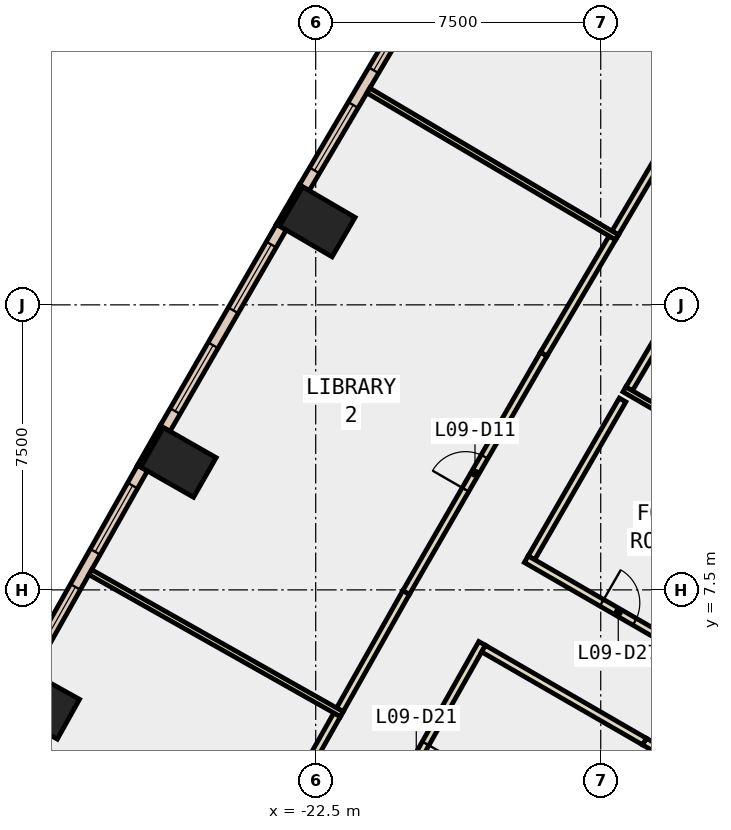
"""IFC4 building model, lengths in metres.
Left out: names, types, materials, properties, quantities, classifications, styles, units other than length and angle.
Written with IfcOpenShell. Run it as: python <this file> out.ifc"""

import sys

from ifc_helpers import new_model, si_unit, direction, frame, frame_2d, origin, origin_2d, place, context, subcontext, project, spatial, polyline, rectangle, outline, extrude, element, fill, save


model = new_model("IFC4")
c1 = context("Model", 3, precision=1e-05, world=origin(), true_north=direction((0.0, 1.0)))
c2 = subcontext(c1, "Body", "Model", "MODEL_VIEW")
j1 = project(units=[si_unit("LENGTHUNIT", "METRE"), si_unit("PLANEANGLEUNIT", "RADIAN")], contexts=[c1])
p1 = place(None, origin())
s1 = spatial("IfcSite", under=j1, at=p1, CompositionType="ELEMENT")
p2 = place(p1, origin())
s2 = spatial("IfcBuilding", under=s1, at=p2, CompositionType="ELEMENT")
p3 = place(p2, frame((0.0, 0.0, 47.6)))
s3 = spatial("IfcBuildingStorey", under=s2, at=p3, CompositionType="ELEMENT", Elevation=47.6)
for number, where, z_axis, x_axis in (
    (1, (-22.457, 17.186, -0.4), (0.0, 0.0, 1.0), (0.504, 0.864, 0.0)),
    (2, (-26.112, 10.855, -0.4), (0.0, 0.0, 1.0), (0.496, 0.869, 0.0)),
    (3, (-29.706, 4.487, -0.4), (0.0, 0.0, 1.0), (0.487, 0.873, 0.0)),
):
    element("IfcColumn", number, at=place(p3, frame(where, z_axis=z_axis, x_axis=x_axis)), inside=s3, PredefinedType="COLUMN", context=c2, shape_type="SweptSolid", body=[
        extrude(rectangle(XDim=1.2, YDim=1.6, at=origin_2d()), origin(), (0.0, 0.0, 1.0), 4.2),
    ])
p4 = place(p3, frame((0.0, 0.0, -0.4)))
e4 = element("IfcWall", 4, at=p4, inside=s3, PredefinedType="SHEAR", context=c2, shape_type="SweptSolid", body=[
    extrude(outline(polyline([(-12.402, 3.02), (-13.267, 3.52), (-13.856, 2.5), (-12.702, 2.5), (-12.402, 3.02)])), origin(), (0.0, 0.0, 1.0), 4.2),
])
p5 = place(p3, frame((-22.888, 18.133, 0.0), z_axis=(0.0, 0.0, 1.0), x_axis=(-0.504225229382, -0.863572184623, 0.0)))
e5 = element("IfcWall", 5, at=p5, inside=s3, PredefinedType="STANDARD", context=c2, shape_type="SweptSolid", body=[
    extrude(rectangle(XDim=1.2, YDim=0.1, at=frame_2d((0.6, 0.0))), origin(), (0.0, 0.0, 1.0), 3.8),
])
p6 = place(p3, frame((-26.553, 11.797, 0.0), z_axis=(0.0, 0.0, 1.0), x_axis=(-0.495766453659, -0.86845588456, 0.0)))
e6 = element("IfcWall", 6, at=p6, inside=s3, PredefinedType="STANDARD", context=c2, shape_type="SweptSolid", body=[
    extrude(rectangle(XDim=1.2, YDim=0.1, at=frame_2d((0.6, 0.0))), origin(), (0.0, 0.0, 1.0), 3.8),
])
p7 = place(p3, frame((-19.688, 23.351, 0.0), z_axis=(0.0, 0.0, 1.0), x_axis=(-0.508412153373, -0.861113861404, 0.0)))
e7 = element("IfcWall", 7, at=p7, inside=s3, PredefinedType="STANDARD", context=c2, shape_type="SweptSolid", body=[
    extrude(rectangle(XDim=6.121, YDim=0.3, at=frame_2d((3.061, 0.0))), origin(), (0.0, 0.0, 1.0), 3.8),
])
p8 = place(p7, frame((0.53, 0.0, 0.9)))
e8 = element("IfcOpeningElement", 8, at=p8, cuts=e7, PredefinedType="OPENING", context=c2, shape_type="SweptSolid", body=[
    extrude(rectangle(XDim=2.0, YDim=2.6, at=frame_2d((1.0, 1.3))), frame((0.0, 0.16, 0.0), z_axis=(0.0, -1.0, 0.0), x_axis=(1.0, 0.0, 0.0)), (0.0, 0.0, 1.0), 0.32),
])
p9 = place(p7, frame((3.591, 0.0, 0.9)))
e9 = element("IfcOpeningElement", 9, at=p9, cuts=e7, PredefinedType="OPENING", context=c2, shape_type="SweptSolid", body=[
    extrude(rectangle(XDim=2.0, YDim=2.6, at=frame_2d((1.0, 1.3))), frame((0.0, 0.16, 0.0), z_axis=(0.0, -1.0, 0.0), x_axis=(1.0, 0.0, 0.0)), (0.0, 0.0, 1.0), 0.32),
])
p10 = place(p3, frame((-23.404, 17.046, 0.0), z_axis=(0.0, 0.0, 1.0), x_axis=(-0.499957248001, -0.866050085256, 0.0)))
e10 = element("IfcWall", 10, at=p10, inside=s3, PredefinedType="STANDARD", context=c2, shape_type="SweptSolid", body=[
    extrude(rectangle(XDim=6.121, YDim=0.3, at=frame_2d((3.06, 0.0))), origin(), (0.0, 0.0, 1.0), 3.8),
])
p11 = place(p10, frame((0.53, 0.0, 0.9)))
e11 = element("IfcOpeningElement", 11, at=p11, cuts=e10, PredefinedType="OPENING", context=c2, shape_type="SweptSolid", body=[
    extrude(rectangle(XDim=2.0, YDim=2.6, at=frame_2d((1.0, 1.3))), frame((0.0, 0.16, 0.0), z_axis=(0.0, -1.0, 0.0), x_axis=(1.0, 0.0, 0.0)), (0.0, 0.0, 1.0), 0.32),
])
p12 = place(p10, frame((3.591, 0.0, 0.9)))
e12 = element("IfcOpeningElement", 12, at=p12, cuts=e10, PredefinedType="OPENING", context=c2, shape_type="SweptSolid", body=[
    extrude(rectangle(XDim=2.0, YDim=2.6, at=frame_2d((1.0, 1.3))), frame((0.0, 0.16, 0.0), z_axis=(0.0, -1.0, 0.0), x_axis=(1.0, 0.0, 0.0)), (0.0, 0.0, 1.0), 0.32),
])
p13 = place(p3, frame((-27.058, 10.705, 0.0), z_axis=(0.0, 0.0, 1.0), x_axis=(-0.49151046248, -0.870871669807, 0.0)))
e13 = element("IfcWall", 13, at=p13, inside=s3, PredefinedType="STANDARD", context=c2, shape_type="SweptSolid", body=[
    extrude(rectangle(XDim=6.122, YDim=0.3, at=frame_2d((3.061, 0.0))), origin(), (0.0, 0.0, 1.0), 3.8),
])
p14 = place(p13, frame((0.53, 0.0, 0.9)))
e14 = element("IfcOpeningElement", 14, at=p14, cuts=e13, PredefinedType="OPENING", context=c2, shape_type="SweptSolid", body=[
    extrude(rectangle(XDim=2.0, YDim=2.6, at=frame_2d((1.0, 1.3))), frame((0.0, 0.16, 0.0), z_axis=(0.0, -1.0, 0.0), x_axis=(1.0, 0.0, 0.0)), (0.0, 0.0, 1.0), 0.32),
])
p15 = place(p13, frame((3.591, 0.0, 0.9)))
e15 = element("IfcOpeningElement", 15, at=p15, cuts=e13, PredefinedType="OPENING", context=c2, shape_type="SweptSolid", body=[
    extrude(rectangle(XDim=2.0, YDim=2.6, at=frame_2d((1.0, 1.3))), frame((0.0, 0.16, 0.0), z_axis=(0.0, -1.0, 0.0), x_axis=(1.0, 0.0, 0.0)), (0.0, 0.0, 1.0), 0.32),
])
p16 = place(p3, frame((-14.425, 12.497, 0.0), z_axis=(0.0, 0.0, 1.0), x_axis=(-0.500026519606, -0.866010092142, 0.0)))
e16 = element("IfcWall", 16, at=p16, inside=s3, PredefinedType="PARTITIONING", context=c2, shape_type="SweptSolid", body=[
    extrude(rectangle(XDim=4.796, YDim=0.2, at=frame_2d((2.398, 0.0))), origin(), (0.0, 0.0, 1.0), 3.8),
])
p17 = place(p3, frame((-16.96, 8.308, 0.0), z_axis=(0.0, 0.0, 1.0), x_axis=(0.866018717003, -0.500011581666, 0.0)))
e17 = element("IfcWall", 17, at=p17, inside=s3, PredefinedType="PARTITIONING", context=c2, shape_type="SweptSolid", body=[
    extrude(rectangle(XDim=5.092, YDim=0.2, at=frame_2d((2.546, 0.0))), origin(), (0.0, 0.0, 1.0), 3.8),
])
p18 = place(p17, frame((2.296, 0.0, 0.0)))
e18 = element("IfcOpeningElement", 18, at=p18, cuts=e17, PredefinedType="OPENING", context=c2, shape_type="SweptSolid", body=[
    extrude(rectangle(XDim=1.0, YDim=2.1, at=frame_2d((0.5, 1.05))), frame((0.0, 0.11, 0.0), z_axis=(0.0, -1.0, 0.0), x_axis=(1.0, 0.0, 0.0)), (0.0, 0.0, 1.0), 0.22),
])
p19 = place(p3, frame((-13.323, 14.364, 0.0), z_axis=(0.0, 0.0, 1.0), x_axis=(-0.508274698505, -0.861195001646, 0.0)))
e19 = element("IfcWall", 19, at=p19, inside=s3, PredefinedType="PARTITIONING", context=c2, shape_type="SweptSolid", body=[
    extrude(rectangle(XDim=1.828, YDim=0.2, at=frame_2d((0.914, 0.0))), origin(), (0.0, 0.0, 1.0), 3.8),
])
p20 = place(p3, frame((-13.417, 3.26, 0.0), z_axis=(0.0, 0.0, 1.0), x_axis=(-0.866071776036, 0.499919672301, 0.0)))
e20 = element("IfcWall", 20, at=p20, inside=s3, PredefinedType="PARTITIONING", context=c2, shape_type="SweptSolid", body=[
    extrude(rectangle(XDim=0.5, YDim=0.2, at=frame_2d((0.25, 0.0))), origin(), (0.0, 0.0, 1.0), 2.4),
])
p21 = place(p3, frame((-18.122, 6.092, 0.0), z_axis=(0.0, 0.0, 1.0), x_axis=(-0.491430359405, -0.870916874251, 0.0)))
e21 = element("IfcWall", 21, at=p21, inside=s3, PredefinedType="PARTITIONING", context=c2, shape_type="SweptSolid", body=[
    extrude(rectangle(XDim=7.047, YDim=0.2, at=frame_2d((3.523, 0.0))), origin(), (0.0, 0.0, 1.0), 3.8),
])
p22 = place(p21, frame((3.024, 0.0, 0.0)))
e22 = element("IfcOpeningElement", 22, at=p22, cuts=e21, PredefinedType="OPENING", context=c2, shape_type="SweptSolid", body=[
    extrude(rectangle(XDim=1.0, YDim=2.1, at=frame_2d((0.5, 1.05))), frame((0.0, 0.11, 0.0), z_axis=(0.0, -1.0, 0.0), x_axis=(1.0, 0.0, 0.0)), (0.0, 0.0, 1.0), 0.22),
])
p23 = place(p3, frame((-14.618, 16.891, 0.0), z_axis=(0.0, 0.0, 1.0), x_axis=(0.508267810274, 0.861199067022, 0.0)))
e23 = element("IfcWall", 23, at=p23, inside=s3, PredefinedType="PARTITIONING", context=c2, shape_type="SweptSolid", body=[
    extrude(rectangle(XDim=3.547, YDim=0.2, at=frame_2d((1.774, 0.0))), origin(), (0.0, 0.0, 1.0), 3.8),
])
p24 = place(p3, frame((-21.863, 4.345, 0.0), z_axis=(0.0, 0.0, 1.0), x_axis=(0.491394823876, 0.87093692485, 0.0)))
e24 = element("IfcWall", 24, at=p24, inside=s3, PredefinedType="PARTITIONING", context=c2, shape_type="SweptSolid", body=[
    extrude(rectangle(XDim=3.547, YDim=0.2, at=frame_2d((1.773, 0.0))), origin(), (0.0, 0.0, 1.0), 3.8),
])
p25 = place(p3, frame((-20.12, 7.434, 0.0), z_axis=(0.0, 0.0, 1.0), x_axis=(0.500039488902, 0.866002603656, 0.0)))
e25 = element("IfcWall", 25, at=p25, inside=s3, PredefinedType="PARTITIONING", context=c2, shape_type="SweptSolid", body=[
    extrude(rectangle(XDim=7.244, YDim=0.2, at=frame_2d((3.622, 0.0))), origin(), (0.0, 0.0, 1.0), 3.8),
])
p26 = place(p25, frame((3.122, 0.0, 0.0)))
e26 = element("IfcOpeningElement", 26, at=p26, cuts=e25, PredefinedType="OPENING", context=c2, shape_type="SweptSolid", body=[
    extrude(rectangle(XDim=1.0, YDim=2.1, at=frame_2d((0.5, 1.05))), frame((0.0, 0.11, 0.0), z_axis=(0.0, -1.0, 0.0), x_axis=(1.0, 0.0, 0.0)), (0.0, 0.0, 1.0), 0.22),
])
p27 = place(p3, frame((-16.498, 13.707, 0.0), z_axis=(0.0, 0.0, 1.0), x_axis=(0.508471945541, 0.861078556578, 0.0)))
e27 = element("IfcWall", 27, at=p27, inside=s3, PredefinedType="PARTITIONING", context=c2, shape_type="SweptSolid", body=[
    extrude(rectangle(XDim=3.548, YDim=0.2, at=frame_2d((1.774, 0.0))), origin(), (0.0, 0.0, 1.0), 3.8),
])
p28 = place(p3, frame((-23.681, 1.124, 0.0), z_axis=(0.0, 0.0, 1.0), x_axis=(0.491485799319, 0.870885588965, 0.0)))
e28 = element("IfcWall", 28, at=p28, inside=s3, PredefinedType="PARTITIONING", context=c2, shape_type="SweptSolid", body=[
    extrude(rectangle(XDim=3.548, YDim=0.2, at=frame_2d((1.774, 0.0))), origin(), (0.0, 0.0, 1.0), 3.8),
])
p29 = place(p3, frame((-14.377, 12.775, 0.0), z_axis=(0.0, 0.0, 1.0), x_axis=(0.866051730117, -0.499954398681, 0.0)))
e29 = element("IfcWall", 29, at=p29, inside=s3, PredefinedType="PARTITIONING", context=c2, shape_type="SweptSolid", body=[
    extrude(rectangle(XDim=5.588, YDim=0.15, at=frame_2d((2.794, 0.0))), origin(), (0.0, 0.0, 1.0), 3.8),
])
p30 = place(p3, frame((-14.57, 16.776, 0.0), z_axis=(0.0, 0.0, 1.0), x_axis=(-0.861124703857, 0.508393788718, 0.0)))
e30 = element("IfcWall", 30, at=p30, inside=s3, PredefinedType="PARTITIONING", context=c2, shape_type="SweptSolid", body=[
    extrude(rectangle(XDim=7.6, YDim=0.15, at=frame_2d((3.8, 0.0))), origin(), (0.0, 0.0, 1.0), 3.8),
])
p31 = place(p3, frame((-21.813, 4.231, 0.0), z_axis=(0.0, 0.0, 1.0), x_axis=(-0.870901264369, 0.491458022337, 0.0)))
e31 = element("IfcWall", 31, at=p31, inside=s3, PredefinedType="PARTITIONING", context=c2, shape_type="SweptSolid", body=[
    extrude(rectangle(XDim=7.6, YDim=0.15, at=frame_2d((3.8, 0.0))), origin(), (0.0, 0.0, 1.0), 3.8),
])
p32 = place(p3, frame((-13.85, 3.51, 0.0), z_axis=(0.0, 0.0, 1.0), x_axis=(-0.865969361037, 0.500097056325, 0.0)))
e32 = element("IfcWall", 32, at=p32, inside=s3, PredefinedType="PARTITIONING", context=c2, shape_type="SweptSolid", body=[
    extrude(rectangle(XDim=4.889, YDim=0.2, at=frame_2d((2.445, 0.0))), origin(), (0.0, 0.0, 1.0), 3.8),
])
p33 = place(p8, origin())
e33 = element("IfcWindow", 33, at=p33, inside=s3, PartitioningType="SINGLE_PANEL", PredefinedType="WINDOW", context=c2, shape_type="SweptSolid", body=[
    extrude(rectangle(XDim=2.0, YDim=2.6, at=frame_2d((1.0, 1.3))), frame((0.0, 0.03, 0.0), z_axis=(0.0, -1.0, 0.0), x_axis=(1.0, 0.0, 0.0)), (0.0, 0.0, 1.0), 0.06),
])
fill(e8, e33)
p34 = place(p9, origin())
e34 = element("IfcWindow", 34, at=p34, inside=s3, PartitioningType="SINGLE_PANEL", PredefinedType="WINDOW", context=c2, shape_type="SweptSolid", body=[
    extrude(rectangle(XDim=2.0, YDim=2.6, at=frame_2d((1.0, 1.3))), frame((0.0, 0.03, 0.0), z_axis=(0.0, -1.0, 0.0), x_axis=(1.0, 0.0, 0.0)), (0.0, 0.0, 1.0), 0.06),
])
fill(e9, e34)
p35 = place(p11, origin())
e35 = element("IfcWindow", 35, at=p35, inside=s3, PartitioningType="SINGLE_PANEL", PredefinedType="WINDOW", context=c2, shape_type="SweptSolid", body=[
    extrude(rectangle(XDim=2.0, YDim=2.6, at=frame_2d((1.0, 1.3))), frame((0.0, 0.03, 0.0), z_axis=(0.0, -1.0, 0.0), x_axis=(1.0, 0.0, 0.0)), (0.0, 0.0, 1.0), 0.06),
])
fill(e11, e35)
p36 = place(p12, origin())
e36 = element("IfcWindow", 36, at=p36, inside=s3, PartitioningType="SINGLE_PANEL", PredefinedType="WINDOW", context=c2, shape_type="SweptSolid", body=[
    extrude(rectangle(XDim=2.0, YDim=2.6, at=frame_2d((1.0, 1.3))), frame((0.0, 0.03, 0.0), z_axis=(0.0, -1.0, 0.0), x_axis=(1.0, 0.0, 0.0)), (0.0, 0.0, 1.0), 0.06),
])
fill(e12, e36)
p37 = place(p14, origin())
e37 = element("IfcWindow", 37, at=p37, inside=s3, PartitioningType="SINGLE_PANEL", PredefinedType="WINDOW", context=c2, shape_type="SweptSolid", body=[
    extrude(rectangle(XDim=2.0, YDim=2.6, at=frame_2d((1.0, 1.3))), frame((0.0, 0.03, 0.0), z_axis=(0.0, -1.0, 0.0), x_axis=(1.0, 0.0, 0.0)), (0.0, 0.0, 1.0), 0.06),
])
fill(e14, e37)
p38 = place(p15, origin())
e38 = element("IfcWindow", 38, at=p38, inside=s3, PartitioningType="SINGLE_PANEL", PredefinedType="WINDOW", context=c2, shape_type="SweptSolid", body=[
    extrude(rectangle(XDim=2.0, YDim=2.6, at=frame_2d((1.0, 1.3))), frame((0.0, 0.03, 0.0), z_axis=(0.0, -1.0, 0.0), x_axis=(1.0, 0.0, 0.0)), (0.0, 0.0, 1.0), 0.06),
])
fill(e15, e38)
p39 = place(p26, origin())
e39 = element("IfcDoor", 39, at=p39, inside=s3, OperationType="SINGLE_SWING_LEFT", PredefinedType="DOOR", context=c2, shape_type="SweptSolid", body=[
    extrude(rectangle(XDim=1.0, YDim=2.1, at=frame_2d((0.5, 1.05))), frame((0.0, 0.025, 0.0), z_axis=(0.0, -1.0, 0.0), x_axis=(1.0, 0.0, 0.0)), (0.0, 0.0, 1.0), 0.05),
])
fill(e26, e39)
p40 = place(p22, origin())
e40 = element("IfcDoor", 40, at=p40, inside=s3, OperationType="SINGLE_SWING_LEFT", PredefinedType="DOOR", context=c2, shape_type="SweptSolid", body=[
    extrude(rectangle(XDim=1.0, YDim=2.1, at=frame_2d((0.5, 1.05))), frame((0.0, 0.025, 0.0), z_axis=(0.0, -1.0, 0.0), x_axis=(1.0, 0.0, 0.0)), (0.0, 0.0, 1.0), 0.05),
])
fill(e22, e40)
p41 = place(p18, origin())
e41 = element("IfcDoor", 41, at=p41, inside=s3, OperationType="SINGLE_SWING_LEFT", PredefinedType="DOOR", context=c2, shape_type="SweptSolid", body=[
    extrude(rectangle(XDim=1.0, YDim=2.1, at=frame_2d((0.5, 1.05))), frame((0.0, 0.025, 0.0), z_axis=(0.0, -1.0, 0.0), x_axis=(1.0, 0.0, 0.0)), (0.0, 0.0, 1.0), 0.05),
])
fill(e18, e41)
save(model, sys.argv[1])
